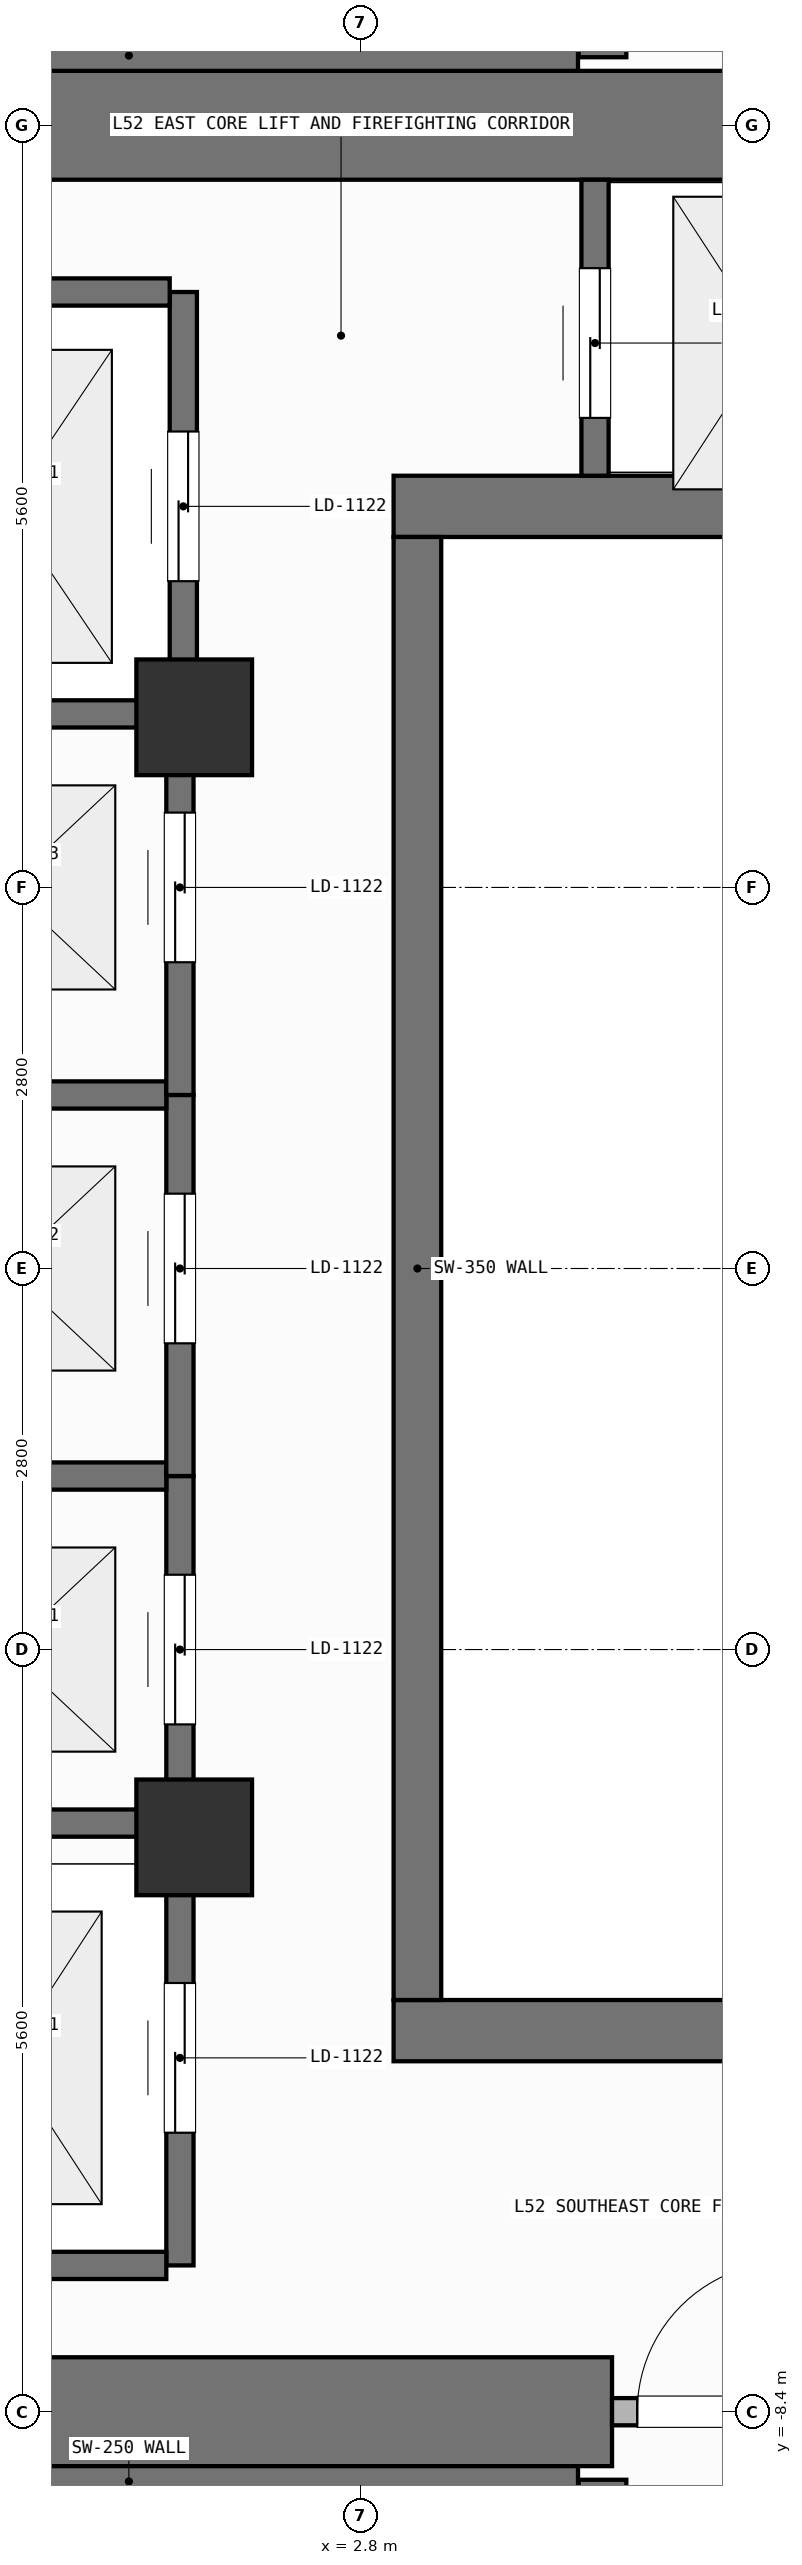
"""IFC4 building model, lengths in metres.
Left out: names, types, materials, properties, quantities, classifications, styles, units other than length and angle.
Written with IfcOpenShell. Run it as: python <this file> out.ifc"""

import sys

from ifc_helpers import new_model, si_unit, direction, frame, frame_2d, origin, origin_2d, place, context, subcontext, project, spatial, rectangle, extrude, element, fill, save


model = new_model("IFC4")
c1 = context("Model", 3, precision=1e-05, world=origin(), true_north=direction((0.0, 1.0)))
c2 = subcontext(c1, "Body", "Model", "MODEL_VIEW")
j1 = project(units=[si_unit("LENGTHUNIT", "METRE"), si_unit("PLANEANGLEUNIT", "RADIAN")], contexts=[c1])
p1 = place(None, origin())
s1 = spatial("IfcSite", under=j1, at=p1, CompositionType="ELEMENT")
p2 = place(p1, origin())
s2 = spatial("IfcBuilding", under=s1, at=p2, CompositionType="ELEMENT")
p3 = place(p2, frame((0.0, 0.0, 210.9)))
s3 = spatial("IfcBuildingStorey", under=s2, at=p3, CompositionType="ELEMENT", Elevation=210.9)
p4 = place(p3, frame((-2.62, -8.4, 0.0), z_axis=(0.0, 0.0, 1.0), x_axis=(1.0, 0.0, 0.0)))
e1 = element("IfcWall", 1, at=p4, inside=s3, PredefinedType="SHEAR", context=c2, shape_type="SweptSolid", body=[
    extrude(rectangle(XDim=7.27, YDim=0.8, at=frame_2d((3.635, 0.0))), origin(), (0.0, 0.0, 1.0), 4.8),
])
p5 = place(p3, frame((-7.55, 8.4, 0.0), z_axis=(0.0, 0.0, 1.0), x_axis=(1.0, 0.0, 0.0)))
e2 = element("IfcWall", 2, at=p5, inside=s3, PredefinedType="SHEAR", context=c2, shape_type="SweptSolid", body=[
    extrude(rectangle(XDim=16.35, YDim=0.8, at=frame_2d((8.175, 0.0))), origin(), (0.0, 0.0, 1.0), 4.8),
])
for number, where, z_axis, x_axis in (
    (3, (3.045, -5.6, 0.0), (0.0, 0.0, 1.0), (1.0, 0.0, 0.0)),
    (4, (3.045, 5.6, 0.0), (0.0, 0.0, 1.0), (1.0, 0.0, 0.0)),
):
    element("IfcWall", number, at=place(p3, frame(where, z_axis=z_axis, x_axis=x_axis)), inside=s3, PredefinedType="SHEAR", context=c2, shape_type="SweptSolid", body=[
        extrude(rectangle(XDim=5.755, YDim=0.45, at=frame_2d((2.877, 0.0))), origin(), (0.0, 0.0, 1.0), 4.8),
    ])
p6 = place(p3, frame((3.22, -5.375, 0.0), z_axis=(0.0, 0.0, 1.0), x_axis=(0.0, 1.0, 0.0)))
e5 = element("IfcWall", 5, at=p6, inside=s3, PredefinedType="SHEAR", context=c2, shape_type="SweptSolid", body=[
    extrude(rectangle(XDim=10.75, YDim=0.35, at=frame_2d((5.375, 0.0))), origin(), (0.0, 0.0, 1.0), 4.8),
])
p7 = place(p3, frame((-2.2, -8.913, 0.0), z_axis=(0.0, 0.0, 1.0), x_axis=(1.0, 0.0, 0.0)))
e6 = element("IfcWall", 6, at=p7, inside=s3, PredefinedType="SHEAR", context=c2, shape_type="SweptSolid", body=[
    extrude(rectangle(XDim=6.6, YDim=0.225, at=frame_2d((3.3, 0.0))), origin(), (0.0, 0.0, 1.0), 4.8),
])
p8 = place(p3, frame((4.58, -8.9, 0.0), z_axis=(0.0, 0.0, 1.0), x_axis=(0.0, -1.0, 0.0)))
e7 = element("IfcWall", 7, at=p8, inside=s3, PredefinedType="SHEAR", context=c2, shape_type="SweptSolid", body=[
    extrude(rectangle(XDim=2.925, YDim=0.35, at=frame_2d((1.462, 0.0))), origin(), (0.0, 0.0, 1.0), 4.8),
])
p9 = place(p8, frame((0.913, 0.0, 0.0)))
e8 = element("IfcOpeningElement", 8, at=p9, cuts=e7, PredefinedType="OPENING", context=c2, shape_type="SweptSolid", body=[
    extrude(rectangle(XDim=1.1, YDim=2.15, at=frame_2d((0.55, 1.075))), frame((0.0, 0.185, 0.0), z_axis=(0.0, -1.0, 0.0), x_axis=(1.0, 0.0, 0.0)), (0.0, 0.0, 1.0), 0.37),
])
p10 = place(p3, frame((-2.2, 8.913, 0.0), z_axis=(0.0, 0.0, 1.0), x_axis=(1.0, 0.0, 0.0)))
e9 = element("IfcWall", 9, at=p10, inside=s3, PredefinedType="SHEAR", context=c2, shape_type="SweptSolid", body=[
    extrude(rectangle(XDim=6.6, YDim=0.225, at=frame_2d((3.3, 0.0))), origin(), (0.0, 0.0, 1.0), 4.8),
])
p11 = place(p3, frame((4.58, 11.825, 0.0), z_axis=(0.0, 0.0, 1.0), x_axis=(0.0, -1.0, 0.0)))
e10 = element("IfcWall", 10, at=p11, inside=s3, PredefinedType="SHEAR", context=c2, shape_type="SweptSolid", body=[
    extrude(rectangle(XDim=2.925, YDim=0.35, at=frame_2d((1.462, 0.0))), origin(), (0.0, 0.0, 1.0), 4.8),
])
p12 = place(p11, frame((0.913, 0.0, 0.0)))
e11 = element("IfcOpeningElement", 11, at=p12, cuts=e10, PredefinedType="OPENING", context=c2, shape_type="SweptSolid", body=[
    extrude(rectangle(XDim=1.1, YDim=2.15, at=frame_2d((0.55, 1.075))), frame((0.0, 0.185, 0.0), z_axis=(0.0, -1.0, 0.0), x_axis=(1.0, 0.0, 0.0)), (0.0, 0.0, 1.0), 0.37),
])
for number, where, z_axis, x_axis in (
    (12, (1.58, -4.18, 0.0), (0.0, 0.0, 1.0), (1.0, 0.0, 0.0)),
    (13, (1.58, 4.05, 0.0), (0.0, 0.0, 1.0), (1.0, 0.0, 0.0)),
):
    element("IfcColumn", number, at=place(p3, frame(where, z_axis=z_axis, x_axis=x_axis)), inside=s3, PredefinedType="COLUMN", context=c2, shape_type="SweptSolid", body=[
        extrude(rectangle(XDim=0.85, YDim=0.85, at=origin_2d()), origin(), (0.0, 0.0, 1.0), 4.8),
    ])
p13 = place(p3, frame((1.475, -4.275, 0.0), z_axis=(0.0, 0.0, 1.0), x_axis=(0.0, 1.0, 0.0)))
e14 = element("IfcWall", 14, at=p13, inside=s3, PredefinedType="SHEAR", context=c2, shape_type="SweptSolid", body=[
    extrude(rectangle(XDim=2.75, YDim=0.2, at=frame_2d((1.375, 0.0))), origin(), (0.0, 0.0, 1.0), 4.58),
])
p14 = place(p13, frame((0.925, 0.0, 0.0)))
e15 = element("IfcOpeningElement", 15, at=p14, cuts=e14, PredefinedType="OPENING", context=c2, shape_type="SweptSolid", body=[
    extrude(rectangle(XDim=1.1, YDim=2.2, at=frame_2d((0.55, 1.1))), frame((0.0, 0.11, 0.0), z_axis=(0.0, -1.0, 0.0), x_axis=(1.0, 0.0, 0.0)), (0.0, 0.0, 1.0), 0.22),
])
for number, where, z_axis, x_axis in (
    (16, (-0.975, -4.075, 0.0), (0.0, 0.0, 1.0), (1.0, 0.0, 0.0)),
    (17, (-0.975, -1.525, 0.0), (0.0, 0.0, 1.0), (1.0, 0.0, 0.0)),
):
    element("IfcWall", number, at=place(p3, frame(where, z_axis=z_axis, x_axis=x_axis)), inside=s3, PredefinedType="SHEAR", context=c2, shape_type="SweptSolid", body=[
        extrude(rectangle(XDim=2.35, YDim=0.2, at=frame_2d((1.175, 0.0))), origin(), (0.0, 0.0, 1.0), 4.58),
    ])
p15 = place(p3, frame((1.475, -1.525, 0.0), z_axis=(0.0, 0.0, 1.0), x_axis=(0.0, 1.0, 0.0)))
e18 = element("IfcWall", 18, at=p15, inside=s3, PredefinedType="SHEAR", context=c2, shape_type="SweptSolid", body=[
    extrude(rectangle(XDim=2.8, YDim=0.2, at=frame_2d((1.4, 0.0))), origin(), (0.0, 0.0, 1.0), 4.58),
])
p16 = place(p15, frame((0.975, 0.0, 0.0)))
e19 = element("IfcOpeningElement", 19, at=p16, cuts=e18, PredefinedType="OPENING", context=c2, shape_type="SweptSolid", body=[
    extrude(rectangle(XDim=1.1, YDim=2.2, at=frame_2d((0.55, 1.1))), frame((0.0, 0.11, 0.0), z_axis=(0.0, -1.0, 0.0), x_axis=(1.0, 0.0, 0.0)), (0.0, 0.0, 1.0), 0.22),
])
p17 = place(p3, frame((-0.975, 1.275, 0.0), z_axis=(0.0, 0.0, 1.0), x_axis=(1.0, 0.0, 0.0)))
e20 = element("IfcWall", 20, at=p17, inside=s3, PredefinedType="SHEAR", context=c2, shape_type="SweptSolid", body=[
    extrude(rectangle(XDim=2.35, YDim=0.2, at=frame_2d((1.175, 0.0))), origin(), (0.0, 0.0, 1.0), 4.58),
])
p18 = place(p3, frame((1.475, 1.275, 0.0), z_axis=(0.0, 0.0, 1.0), x_axis=(0.0, 1.0, 0.0)))
e21 = element("IfcWall", 21, at=p18, inside=s3, PredefinedType="SHEAR", context=c2, shape_type="SweptSolid", body=[
    extrude(rectangle(XDim=2.8, YDim=0.2, at=frame_2d((1.4, 0.0))), origin(), (0.0, 0.0, 1.0), 4.58),
])
p19 = place(p18, frame((0.975, 0.0, 0.0)))
e22 = element("IfcOpeningElement", 22, at=p19, cuts=e21, PredefinedType="OPENING", context=c2, shape_type="SweptSolid", body=[
    extrude(rectangle(XDim=1.1, YDim=2.2, at=frame_2d((0.55, 1.1))), frame((0.0, 0.11, 0.0), z_axis=(0.0, -1.0, 0.0), x_axis=(1.0, 0.0, 0.0)), (0.0, 0.0, 1.0), 0.22),
])
p20 = place(p3, frame((-0.975, 4.075, 0.0), z_axis=(0.0, 0.0, 1.0), x_axis=(1.0, 0.0, 0.0)))
e23 = element("IfcWall", 23, at=p20, inside=s3, PredefinedType="SHEAR", context=c2, shape_type="SweptSolid", body=[
    extrude(rectangle(XDim=2.35, YDim=0.2, at=frame_2d((1.175, 0.0))), origin(), (0.0, 0.0, 1.0), 4.58),
])
p21 = place(p3, frame((1.5, 4.025, 0.0), z_axis=(0.0, 0.0, 1.0), x_axis=(0.0, 1.0, 0.0)))
e24 = element("IfcWall", 24, at=p21, inside=s3, PredefinedType="SHEAR", context=c2, shape_type="SweptSolid", body=[
    extrude(rectangle(XDim=3.15, YDim=0.2, at=frame_2d((1.575, 0.0))), origin(), (0.0, 0.0, 1.0), 4.58),
])
p22 = place(p21, frame((1.025, 0.0, 0.0)))
e25 = element("IfcOpeningElement", 25, at=p22, cuts=e24, PredefinedType="OPENING", context=c2, shape_type="SweptSolid", body=[
    extrude(rectangle(XDim=1.1, YDim=2.2, at=frame_2d((0.55, 1.1))), frame((0.0, 0.11, 0.0), z_axis=(0.0, -1.0, 0.0), x_axis=(1.0, 0.0, 0.0)), (0.0, 0.0, 1.0), 0.22),
])
p23 = place(p3, frame((-1.0, 7.175, 0.0), z_axis=(0.0, 0.0, 1.0), x_axis=(1.0, 0.0, 0.0)))
e26 = element("IfcWall", 26, at=p23, inside=s3, PredefinedType="SHEAR", context=c2, shape_type="SweptSolid", body=[
    extrude(rectangle(XDim=2.4, YDim=0.2, at=frame_2d((1.2, 0.0))), origin(), (0.0, 0.0, 1.0), 4.58),
])
p24 = place(p3, frame((1.475, -7.325, 0.0), z_axis=(0.0, 0.0, 1.0), x_axis=(0.0, 1.0, 0.0)))
e27 = element("IfcWall", 27, at=p24, inside=s3, PredefinedType="SHEAR", context=c2, shape_type="SweptSolid", body=[
    extrude(rectangle(XDim=3.05, YDim=0.2, at=frame_2d((1.525, 0.0))), origin(), (0.0, 0.0, 1.0), 4.58),
])
p25 = place(p24, frame((0.975, 0.0, 0.0)))
e28 = element("IfcOpeningElement", 28, at=p25, cuts=e27, PredefinedType="OPENING", context=c2, shape_type="SweptSolid", body=[
    extrude(rectangle(XDim=1.1, YDim=2.2, at=frame_2d((0.55, 1.1))), frame((0.0, 0.11, 0.0), z_axis=(0.0, -1.0, 0.0), x_axis=(1.0, 0.0, 0.0)), (0.0, 0.0, 1.0), 0.22),
])
p26 = place(p3, frame((-0.975, -7.325, 0.0), z_axis=(0.0, 0.0, 1.0), x_axis=(1.0, 0.0, 0.0)))
e29 = element("IfcWall", 29, at=p26, inside=s3, PredefinedType="SHEAR", context=c2, shape_type="SweptSolid", body=[
    extrude(rectangle(XDim=2.35, YDim=0.2, at=frame_2d((1.175, 0.0))), origin(), (0.0, 0.0, 1.0), 4.58),
])
p27 = place(p3, frame((4.525, 5.825, 0.0), z_axis=(0.0, 0.0, 1.0), x_axis=(0.0, 1.0, 0.0)))
e30 = element("IfcWall", 30, at=p27, inside=s3, PredefinedType="SHEAR", context=c2, shape_type="SweptSolid", body=[
    extrude(rectangle(XDim=2.175, YDim=0.2, at=frame_2d((1.087, 0.0))), origin(), (0.0, 0.0, 1.0), 4.58),
])
p28 = place(p27, frame((0.425, 0.0, 0.0)))
e31 = element("IfcOpeningElement", 31, at=p28, cuts=e30, PredefinedType="OPENING", context=c2, shape_type="SweptSolid", body=[
    extrude(rectangle(XDim=1.1, YDim=2.2, at=frame_2d((0.55, 1.1))), frame((0.0, 0.11, 0.0), z_axis=(0.0, -1.0, 0.0), x_axis=(1.0, 0.0, 0.0)), (0.0, 0.0, 1.0), 0.22),
])
p29 = place(p3, frame((4.65, -8.4, 0.0), z_axis=(0.0, 0.0, 1.0), x_axis=(1.0, 0.0, 0.0)))
e32 = element("IfcWall", 32, at=p29, inside=s3, PredefinedType="SOLIDWALL", context=c2, shape_type="SweptSolid", body=[
    extrude(rectangle(XDim=1.47, YDim=0.2, at=frame_2d((0.735, 0.0))), origin(), (0.0, 0.0, 1.0), 3.72),
])
p30 = place(p29, frame((0.185, 0.0, 0.0)))
e33 = element("IfcOpeningElement", 33, at=p30, cuts=e32, PredefinedType="OPENING", context=c2, shape_type="SweptSolid", body=[
    extrude(rectangle(XDim=1.1, YDim=2.15, at=frame_2d((0.55, 1.075))), frame((0.0, 0.11, 0.0), z_axis=(0.0, -1.0, 0.0), x_axis=(1.0, 0.0, 0.0)), (0.0, 0.0, 1.0), 0.22),
])
p31 = place(p14, origin())
e34 = element("IfcDoor", 34, at=p31, inside=s3, OperationType="SLIDING_TO_LEFT", PredefinedType="DOOR", context=c2, shape_type="SweptSolid", body=[
    extrude(rectangle(XDim=1.1, YDim=2.2, at=frame_2d((0.55, 1.1))), frame((0.0, 0.025, 0.0), z_axis=(0.0, -1.0, 0.0), x_axis=(1.0, 0.0, 0.0)), (0.0, 0.0, 1.0), 0.05),
])
fill(e15, e34)
p32 = place(p16, origin())
e35 = element("IfcDoor", 35, at=p32, inside=s3, OperationType="SLIDING_TO_LEFT", PredefinedType="DOOR", context=c2, shape_type="SweptSolid", body=[
    extrude(rectangle(XDim=1.1, YDim=2.2, at=frame_2d((0.55, 1.1))), frame((0.0, 0.025, 0.0), z_axis=(0.0, -1.0, 0.0), x_axis=(1.0, 0.0, 0.0)), (0.0, 0.0, 1.0), 0.05),
])
fill(e19, e35)
p33 = place(p19, origin())
e36 = element("IfcDoor", 36, at=p33, inside=s3, OperationType="SLIDING_TO_LEFT", PredefinedType="DOOR", context=c2, shape_type="SweptSolid", body=[
    extrude(rectangle(XDim=1.1, YDim=2.2, at=frame_2d((0.55, 1.1))), frame((0.0, 0.025, 0.0), z_axis=(0.0, -1.0, 0.0), x_axis=(1.0, 0.0, 0.0)), (0.0, 0.0, 1.0), 0.05),
])
fill(e22, e36)
p34 = place(p22, origin())
e37 = element("IfcDoor", 37, at=p34, inside=s3, OperationType="SLIDING_TO_LEFT", PredefinedType="DOOR", context=c2, shape_type="SweptSolid", body=[
    extrude(rectangle(XDim=1.1, YDim=2.2, at=frame_2d((0.55, 1.1))), frame((0.0, 0.025, 0.0), z_axis=(0.0, -1.0, 0.0), x_axis=(1.0, 0.0, 0.0)), (0.0, 0.0, 1.0), 0.05),
])
fill(e25, e37)
p35 = place(p25, origin())
e38 = element("IfcDoor", 38, at=p35, inside=s3, OperationType="SLIDING_TO_LEFT", PredefinedType="DOOR", context=c2, shape_type="SweptSolid", body=[
    extrude(rectangle(XDim=1.1, YDim=2.2, at=frame_2d((0.55, 1.1))), frame((0.0, 0.025, 0.0), z_axis=(0.0, -1.0, 0.0), x_axis=(1.0, 0.0, 0.0)), (0.0, 0.0, 1.0), 0.05),
])
fill(e28, e38)
p36 = place(p28, origin())
e39 = element("IfcDoor", 39, at=p36, inside=s3, OperationType="SLIDING_TO_LEFT", PredefinedType="DOOR", context=c2, shape_type="SweptSolid", body=[
    extrude(rectangle(XDim=1.1, YDim=2.2, at=frame_2d((0.55, 1.1))), frame((0.0, 0.025, 0.0), z_axis=(0.0, -1.0, 0.0), x_axis=(1.0, 0.0, 0.0)), (0.0, 0.0, 1.0), 0.05),
])
fill(e31, e39)
p37 = place(p30, origin())
e40 = element("IfcDoor", 40, at=p37, inside=s3, OperationType="SINGLE_SWING_RIGHT", PredefinedType="DOOR", context=c2, shape_type="SweptSolid", body=[
    extrude(rectangle(XDim=1.1, YDim=2.15, at=frame_2d((0.55, 1.075))), frame((0.0, 0.025, 0.0), z_axis=(0.0, -1.0, 0.0), x_axis=(1.0, 0.0, 0.0)), (0.0, 0.0, 1.0), 0.05),
])
fill(e33, e40)
save(model, sys.argv[1])
